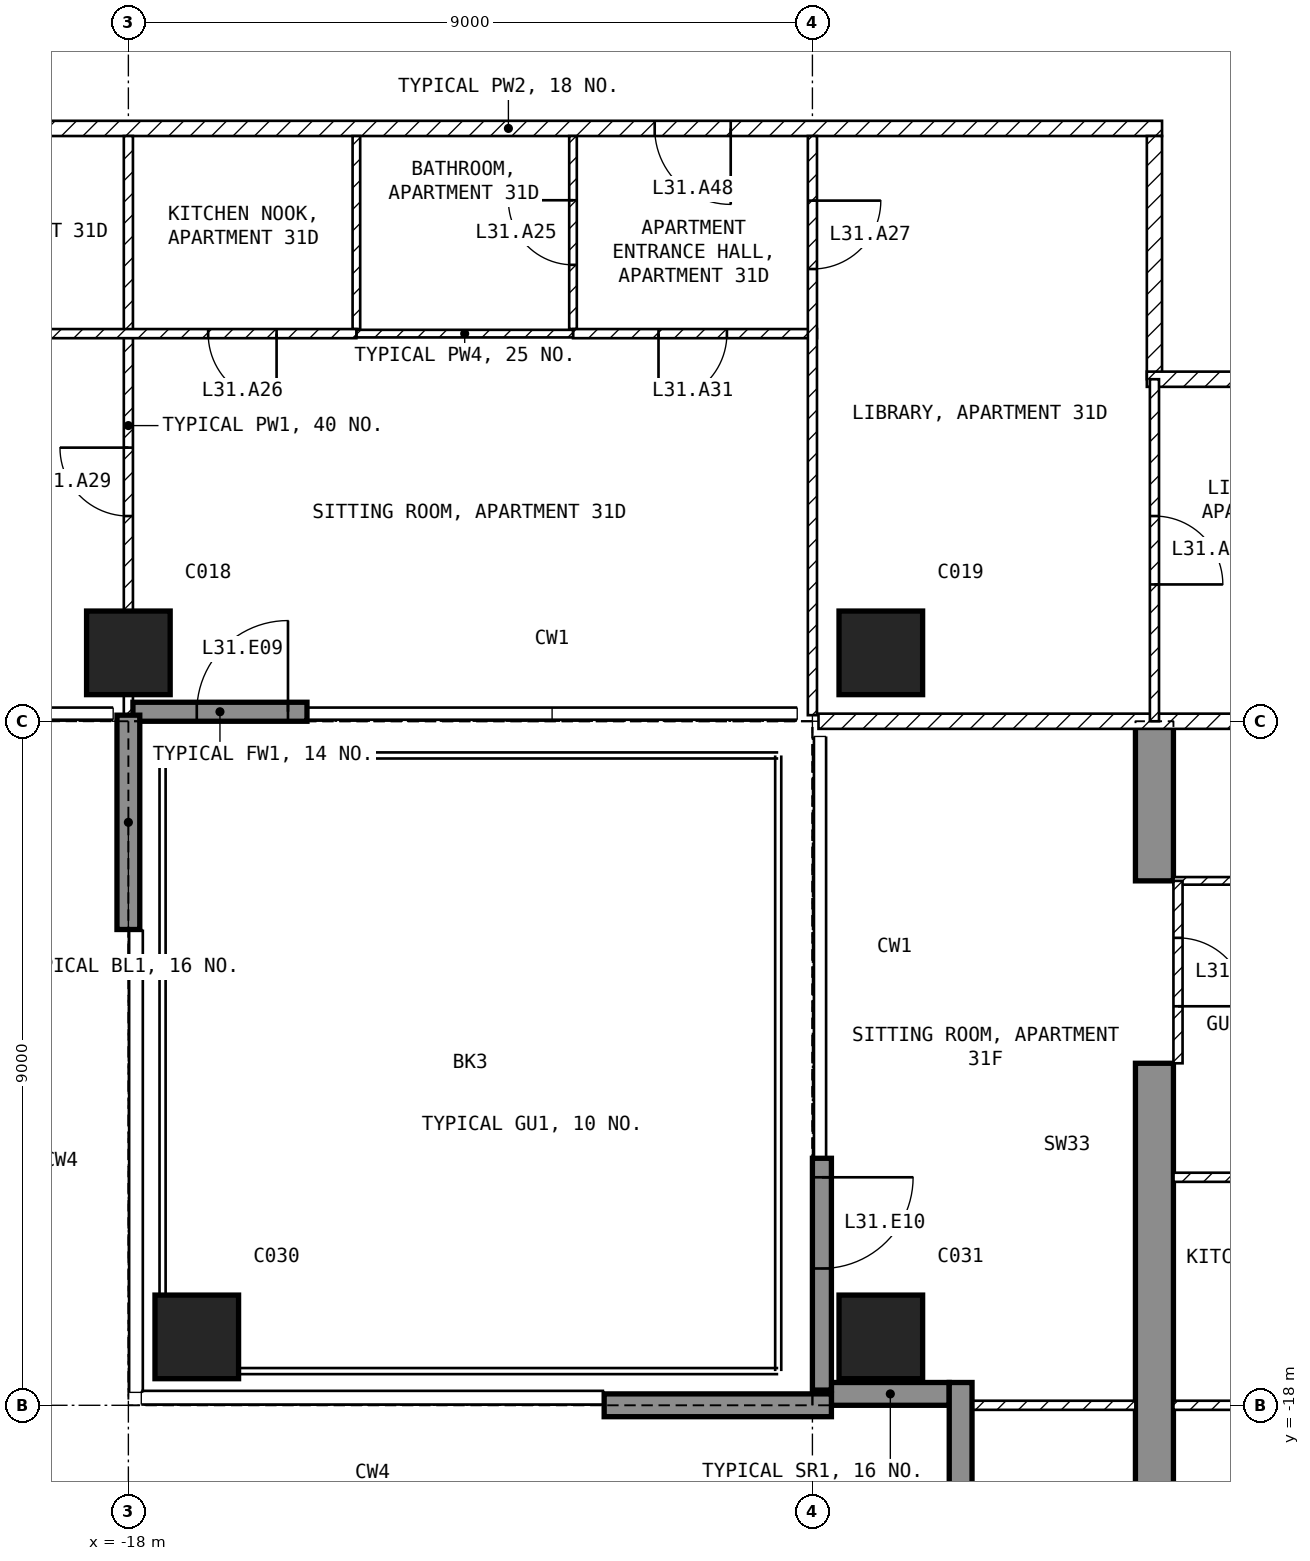
"""IFC4 building model, lengths in metres.
Left out: names, types, materials, properties, quantities, classifications, styles, units other than length and angle.
Written with IfcOpenShell. Run it as: python <this file> out.ifc"""

import sys

from ifc_helpers import new_model, si_unit, direction, frame, frame_2d, origin, origin_2d, place, context, subcontext, project, spatial, polyline, rectangle, outline, extrude, element, fill, save


model = new_model("IFC4")
c1 = context("Model", 3, precision=1e-05, world=origin(), true_north=direction((0.0, 1.0)))
c2 = subcontext(c1, "Body", "Model", "MODEL_VIEW")
j1 = project(units=[si_unit("LENGTHUNIT", "METRE"), si_unit("PLANEANGLEUNIT", "RADIAN")], contexts=[c1])
p1 = place(None, origin())
s1 = spatial("IfcSite", under=j1, at=p1, CompositionType="ELEMENT")
p2 = place(p1, origin())
s2 = spatial("IfcBuilding", under=s1, at=p2, CompositionType="ELEMENT")
p3 = place(p2, frame((0.0, 0.0, 130.4)))
s3 = spatial("IfcBuildingStorey", under=s2, at=p3, CompositionType="ELEMENT", Elevation=130.4)
for number, where, z_axis, x_axis in (
    (1, (-18.0, -8.1, -0.25), (0.0, 0.0, 1.0), (1.0, 0.0, 0.0)),
    (2, (-8.1, -17.1, -0.25), (0.0, 0.0, 1.0), (1.0, 0.0, 0.0)),
    (3, (-8.1, -8.1, -0.25), (0.0, 0.0, 1.0), (1.0, 0.0, 0.0)),
    (4, (-17.1, -17.1, -0.25), (0.0, 0.0, 1.0), (1.0, 0.0, 0.0)),
):
    element("IfcColumn", number, at=place(p3, frame(where, z_axis=z_axis, x_axis=x_axis)), inside=s3, PredefinedType="COLUMN", context=c2, shape_type="SweptSolid", body=[
        extrude(rectangle(XDim=1.1, YDim=1.1, at=origin_2d()), origin(), (0.0, 0.0, 1.0), 3.5),
    ])
p4 = place(p3, frame((-4.75, -20.15, -0.25), z_axis=(1.0, 0.0, 0.0), x_axis=(0.0, 1.0, 0.0)))
e5 = element("IfcWall", 5, at=p4, inside=s3, PredefinedType="SHEAR", context=c2, shape_type="SweptSolid", body=[
    extrude(outline(polyline([(0.0, 0.0), (6.65, 0.0), (6.65, 2.65), (9.05, 2.65), (9.05, 0.0), (11.15, 0.0), (11.15, 3.5), (0.0, 3.5), (0.0, 0.0)])), origin(), (0.0, 0.0, 1.0), 0.5),
])
p5 = place(p3, frame((-17.94, -8.875, 0.0), z_axis=(0.0, 0.0, 1.0), x_axis=(1.0, 0.0, 0.0)))
e6 = element("IfcWall", 6, at=p5, inside=s3, PredefinedType="SOLIDWALL", context=c2, shape_type="SweptSolid", body=[
    extrude(rectangle(XDim=2.29, YDim=0.25, at=frame_2d((1.145, 0.0))), origin(), (0.0, 0.0, 1.0), 3.25),
])
p6 = place(p5, frame((0.84, 0.0, 0.0)))
e7 = element("IfcOpeningElement", 7, at=p6, cuts=e6, PredefinedType="OPENING", context=c2, shape_type="SweptSolid", body=[
    extrude(rectangle(XDim=1.2, YDim=2.4, at=frame_2d((0.6, 1.2))), frame((0.0, 0.135, 0.0), z_axis=(0.0, -1.0, 0.0), x_axis=(1.0, 0.0, 0.0)), (0.0, 0.0, 1.0), 0.27),
])
p7 = place(p3, frame((-8.875, -14.75, 0.0), z_axis=(0.0, 0.0, 1.0), x_axis=(0.0, -1.0, 0.0)))
e8 = element("IfcWall", 8, at=p7, inside=s3, PredefinedType="SOLIDWALL", context=c2, shape_type="SweptSolid", body=[
    extrude(rectangle(XDim=3.05, YDim=0.25, at=frame_2d((1.525, 0.0))), origin(), (0.0, 0.0, 1.0), 3.25),
])
p8 = place(p7, frame((0.25, 0.0, 0.0)))
e9 = element("IfcOpeningElement", 9, at=p8, cuts=e8, PredefinedType="OPENING", context=c2, shape_type="SweptSolid", body=[
    extrude(rectangle(XDim=1.2, YDim=2.4, at=frame_2d((0.6, 1.2))), frame((0.0, 0.135, 0.0), z_axis=(0.0, -1.0, 0.0), x_axis=(1.0, 0.0, 0.0)), (0.0, 0.0, 1.0), 0.27),
])
p9 = place(p3, frame((-8.75, -17.85, 0.0), z_axis=(0.0, 0.0, 1.0), x_axis=(1.0, 0.0, 0.0)))
e10 = element("IfcWall", 10, at=p9, inside=s3, PredefinedType="SOLIDWALL", context=c2, shape_type="SweptSolid", body=[
    extrude(rectangle(XDim=1.55, YDim=0.3, at=frame_2d((0.775, 0.0))), origin(), (0.0, 0.0, 1.0), 3.25),
])
p10 = place(p3, frame((-7.05, -17.7, 0.0), z_axis=(0.0, 0.0, 1.0), x_axis=(0.0, -1.0, 0.0)))
e11 = element("IfcWall", 11, at=p10, inside=s3, PredefinedType="SOLIDWALL", context=c2, shape_type="SweptSolid", body=[
    extrude(rectangle(XDim=1.8, YDim=0.3, at=frame_2d((0.9, 0.0))), origin(), (0.0, 0.0, 1.0), 3.25),
])
p11 = place(p3, frame((-18.0, -8.92, 0.0), z_axis=(0.0, 0.0, 1.0), x_axis=(0.0, -1.0, 0.0)))
e12 = element("IfcWall", 12, at=p11, inside=s3, PredefinedType="SOLIDWALL", context=c2, shape_type="SweptSolid", body=[
    extrude(rectangle(XDim=2.82, YDim=0.3, at=frame_2d((1.41, 0.0))), origin(), (0.0, 0.0, 1.0), 3.25),
])
p12 = place(p3, frame((-8.75, -18.0, 0.0), z_axis=(0.0, 0.0, 1.0), x_axis=(-1.0, 0.0, 0.0)))
e13 = element("IfcWall", 13, at=p12, inside=s3, PredefinedType="SOLIDWALL", context=c2, shape_type="SweptSolid", body=[
    extrude(rectangle(XDim=2.99, YDim=0.3, at=frame_2d((1.495, 0.0))), origin(), (0.0, 0.0, 1.0), 3.25),
])
p13 = place(p3, frame((-4.4, -1.2, 0.0), z_axis=(0.0, 0.0, 1.0), x_axis=(-1.0, 0.0, 0.0)))
e14 = element("IfcWall", 14, at=p13, inside=s3, PredefinedType="PARTITIONING", context=c2, shape_type="SweptSolid", body=[
    extrude(rectangle(XDim=17.2, YDim=0.2, at=frame_2d((8.6, 0.0))), origin(), (0.0, 0.0, 1.0), 3.25),
])
p14 = place(p13, frame((5.675, 0.0, 0.0)))
e15 = element("IfcOpeningElement", 15, at=p14, cuts=e14, PredefinedType="OPENING", context=c2, shape_type="SweptSolid", body=[
    extrude(rectangle(XDim=1.0, YDim=2.1, at=frame_2d((0.5, 1.05))), frame((0.0, 0.11, 0.0), z_axis=(0.0, -1.0, 0.0), x_axis=(1.0, 0.0, 0.0)), (0.0, 0.0, 1.0), 0.22),
])
p15 = place(p3, frame((-4.5, -4.5, 0.0), z_axis=(0.0, 0.0, 1.0), x_axis=(0.0, 1.0, 0.0)))
e16 = element("IfcWall", 16, at=p15, inside=s3, PredefinedType="PARTITIONING", context=c2, shape_type="SweptSolid", body=[
    extrude(rectangle(XDim=3.2, YDim=0.2, at=frame_2d((1.6, 0.0))), origin(), (0.0, 0.0, 1.0), 3.25),
])
p16 = place(p3, frame((-1.1, -4.5, 0.0), z_axis=(0.0, 0.0, 1.0), x_axis=(-1.0, 0.0, 0.0)))
e17 = element("IfcWall", 17, at=p16, inside=s3, PredefinedType="PARTITIONING", context=c2, shape_type="SweptSolid", body=[
    extrude(rectangle(XDim=3.5, YDim=0.2, at=frame_2d((1.75, 0.0))), origin(), (0.0, 0.0, 1.0), 3.25),
])
p17 = place(p3, frame((8.92, -9.0, 0.0), z_axis=(0.0, 0.0, 1.0), x_axis=(-1.0, 0.0, 0.0)))
e18 = element("IfcWall", 18, at=p17, inside=s3, PredefinedType="PARTITIONING", context=c2, shape_type="SweptSolid", body=[
    extrude(rectangle(XDim=17.84, YDim=0.2, at=frame_2d((8.92, 0.0))), origin(), (0.0, 0.0, 1.0), 3.25),
])
p18 = place(p17, frame((8.42, 0.0, 0.0)))
e19 = element("IfcOpeningElement", 19, at=p18, cuts=e18, PredefinedType="OPENING", context=c2, shape_type="SweptSolid", body=[
    extrude(rectangle(XDim=1.0, YDim=2.1, at=frame_2d((0.5, 1.05))), frame((0.0, 0.11, 0.0), z_axis=(0.0, -1.0, 0.0), x_axis=(1.0, 0.0, 0.0)), (0.0, 0.0, 1.0), 0.22),
])
p19 = place(p3, frame((-12.15, -3.84, 0.0), z_axis=(0.0, 0.0, 1.0), x_axis=(0.0, 1.0, 0.0)))
e20 = element("IfcWall", 20, at=p19, inside=s3, PredefinedType="PARTITIONING", context=c2, shape_type="SweptSolid", body=[
    extrude(rectangle(XDim=2.54, YDim=0.1, at=frame_2d((1.27, 0.0))), origin(), (0.0, 0.0, 1.0), 3.25),
])
p20 = place(p19, frame((0.845, 0.0, 0.0)))
e21 = element("IfcOpeningElement", 21, at=p20, cuts=e20, PredefinedType="OPENING", context=c2, shape_type="SweptSolid", body=[
    extrude(rectangle(XDim=0.85, YDim=2.1, at=frame_2d((0.425, 1.05))), frame((0.0, 0.06, 0.0), z_axis=(0.0, -1.0, 0.0), x_axis=(1.0, 0.0, 0.0)), (0.0, 0.0, 1.0), 0.12),
])
p21 = place(p3, frame((-8.94, -3.9, 0.0), z_axis=(0.0, 0.0, 1.0), x_axis=(-1.0, 0.0, 0.0)))
e22 = element("IfcWall", 22, at=p21, inside=s3, PredefinedType="PARTITIONING", context=c2, shape_type="SweptSolid", body=[
    extrude(rectangle(XDim=3.21, YDim=0.12, at=frame_2d((1.605, 0.0))), origin(), (0.0, 0.0, 1.0), 3.25),
])
p22 = place(p21, frame((1.185, 0.0, 0.0)))
e23 = element("IfcOpeningElement", 23, at=p22, cuts=e22, PredefinedType="OPENING", context=c2, shape_type="SweptSolid", body=[
    extrude(rectangle(XDim=0.9, YDim=2.1, at=frame_2d((0.45, 1.05))), frame((0.0, 0.07, 0.0), z_axis=(0.0, -1.0, 0.0), x_axis=(1.0, 0.0, 0.0)), (0.0, 0.0, 1.0), 0.14),
])
p23 = place(p3, frame((-9.0, -1.3, 0.0), z_axis=(0.0, 0.0, 1.0), x_axis=(0.0, -1.0, 0.0)))
e24 = element("IfcWall", 24, at=p23, inside=s3, PredefinedType="PARTITIONING", context=c2, shape_type="SweptSolid", body=[
    extrude(rectangle(XDim=7.62, YDim=0.12, at=frame_2d((3.81, 0.0))), origin(), (0.0, 0.0, 1.0), 3.25),
])
p24 = place(p23, frame((0.85, 0.0, 0.0)))
e25 = element("IfcOpeningElement", 25, at=p24, cuts=e24, PredefinedType="OPENING", context=c2, shape_type="SweptSolid", body=[
    extrude(rectangle(XDim=0.9, YDim=2.1, at=frame_2d((0.45, 1.05))), frame((0.0, 0.07, 0.0), z_axis=(0.0, -1.0, 0.0), x_axis=(1.0, 0.0, 0.0)), (0.0, 0.0, 1.0), 0.14),
])
p25 = place(p3, frame((-15.0, -3.84, 0.0), z_axis=(0.0, 0.0, 1.0), x_axis=(0.0, 1.0, 0.0)))
e26 = element("IfcWall", 26, at=p25, inside=s3, PredefinedType="PARTITIONING", context=c2, shape_type="SweptSolid", body=[
    extrude(rectangle(XDim=2.54, YDim=0.1, at=frame_2d((1.27, 0.0))), origin(), (0.0, 0.0, 1.0), 3.25),
])
p26 = place(p3, frame((-12.15, -3.9, 0.0), z_axis=(0.0, 0.0, 1.0), x_axis=(-1.0, 0.0, 0.0)))
e27 = element("IfcWall", 27, at=p26, inside=s3, PredefinedType="PARTITIONING", context=c2, shape_type="SweptSolid", body=[
    extrude(rectangle(XDim=2.85, YDim=0.1, at=frame_2d((1.425, 0.0))), origin(), (0.0, 0.0, 1.0), 3.25),
])
p27 = place(p3, frame((-18.0, -8.92, 0.0), z_axis=(0.0, 0.0, 1.0), x_axis=(0.0, 1.0, 0.0)))
e28 = element("IfcWall", 28, at=p27, inside=s3, PredefinedType="PARTITIONING", context=c2, shape_type="SweptSolid", body=[
    extrude(rectangle(XDim=7.62, YDim=0.12, at=frame_2d((3.81, 0.0))), origin(), (0.0, 0.0, 1.0), 2.414),
])
p28 = place(p27, frame((2.62, 0.0, 0.0)))
e29 = element("IfcOpeningElement", 29, at=p28, cuts=e28, PredefinedType="OPENING", context=c2, shape_type="SweptSolid", body=[
    extrude(rectangle(XDim=0.9, YDim=2.1, at=frame_2d((0.45, 1.05))), frame((0.0, 0.07, 0.0), z_axis=(0.0, -1.0, 0.0), x_axis=(1.0, 0.0, 0.0)), (0.0, 0.0, 1.0), 0.14),
])
p29 = place(p3, frame((-15.0, -3.9, 0.0), z_axis=(0.0, 0.0, 1.0), x_axis=(-1.0, 0.0, 0.0)))
e30 = element("IfcWall", 30, at=p29, inside=s3, PredefinedType="PARTITIONING", context=c2, shape_type="SweptSolid", body=[
    extrude(rectangle(XDim=6.6, YDim=0.12, at=frame_2d((3.3, 0.0))), origin(), (0.0, 0.0, 1.0), 3.25),
])
p30 = place(p29, frame((1.05, 0.0, 0.0)))
e31 = element("IfcOpeningElement", 31, at=p30, cuts=e30, PredefinedType="OPENING", context=c2, shape_type="SweptSolid", body=[
    extrude(rectangle(XDim=0.9, YDim=2.1, at=frame_2d((0.45, 1.05))), frame((0.0, 0.07, 0.0), z_axis=(0.0, -1.0, 0.0), x_axis=(1.0, 0.0, 0.0)), (0.0, 0.0, 1.0), 0.14),
])
p31 = place(p29, frame((4.35, 0.0, 0.0)))
e32 = element("IfcOpeningElement", 32, at=p31, cuts=e30, PredefinedType="OPENING", context=c2, shape_type="SweptSolid", body=[
    extrude(rectangle(XDim=0.9, YDim=2.1, at=frame_2d((0.45, 1.05))), frame((0.0, 0.07, 0.0), z_axis=(0.0, -1.0, 0.0), x_axis=(1.0, 0.0, 0.0)), (0.0, 0.0, 1.0), 0.14),
])
p32 = place(p3, frame((-4.5, -4.5, 0.0), z_axis=(0.0, 0.0, 1.0), x_axis=(0.0, -1.0, 0.0)))
e33 = element("IfcWall", 33, at=p32, inside=s3, PredefinedType="PARTITIONING", context=c2, shape_type="SweptSolid", body=[
    extrude(rectangle(XDim=4.5, YDim=0.12, at=frame_2d((2.25, 0.0))), origin(), (0.0, 0.0, 1.0), 3.25),
])
p33 = place(p32, frame((1.8, 0.0, 0.0)))
e34 = element("IfcOpeningElement", 34, at=p33, cuts=e33, PredefinedType="OPENING", context=c2, shape_type="SweptSolid", body=[
    extrude(rectangle(XDim=0.9, YDim=2.1, at=frame_2d((0.45, 1.05))), frame((0.0, 0.07, 0.0), z_axis=(0.0, -1.0, 0.0), x_axis=(1.0, 0.0, 0.0)), (0.0, 0.0, 1.0), 0.14),
])
p34 = place(p3, frame((-2.1, -11.1, 0.0), z_axis=(0.0, 0.0, 1.0), x_axis=(-1.0, 0.0, 0.0)))
e35 = element("IfcWall", 35, at=p34, inside=s3, PredefinedType="PARTITIONING", context=c2, shape_type="SweptSolid", body=[
    extrude(rectangle(XDim=2.15, YDim=0.1, at=frame_2d((1.075, 0.0))), origin(), (0.0, 0.0, 1.0), 3.25),
])
p35 = place(p3, frame((-0.44, -15.0, 0.0), z_axis=(0.0, 0.0, 1.0), x_axis=(-1.0, 0.0, 0.0)))
e36 = element("IfcWall", 36, at=p35, inside=s3, PredefinedType="PARTITIONING", context=c2, shape_type="SweptSolid", body=[
    extrude(rectangle(XDim=3.81, YDim=0.12, at=frame_2d((1.905, 0.0))), origin(), (0.0, 0.0, 1.0), 3.25),
])
p36 = place(p3, frame((4.25, -18.0, 0.0), z_axis=(0.0, 0.0, 1.0), x_axis=(-1.0, 0.0, 0.0)))
e37 = element("IfcWall", 37, at=p36, inside=s3, PredefinedType="PARTITIONING", context=c2, shape_type="SweptSolid", body=[
    extrude(rectangle(XDim=8.5, YDim=0.12, at=frame_2d((4.25, 0.0))), origin(), (0.0, 0.0, 1.0), 3.25),
])
p37 = place(p36, frame((1.925, 0.0, 0.0)))
e38 = element("IfcOpeningElement", 38, at=p37, cuts=e37, PredefinedType="OPENING", context=c2, shape_type="SweptSolid", body=[
    extrude(rectangle(XDim=0.9, YDim=2.1, at=frame_2d((0.45, 1.05))), frame((0.0, 0.07, 0.0), z_axis=(0.0, -1.0, 0.0), x_axis=(1.0, 0.0, 0.0)), (0.0, 0.0, 1.0), 0.14),
])
p38 = place(p3, frame((-4.75, -18.0, 0.0), z_axis=(0.0, 0.0, 1.0), x_axis=(-1.0, 0.0, 0.0)))
e39 = element("IfcWall", 39, at=p38, inside=s3, PredefinedType="PARTITIONING", context=c2, shape_type="SweptSolid", body=[
    extrude(rectangle(XDim=2.37, YDim=0.12, at=frame_2d((1.185, 0.0))), origin(), (0.0, 0.0, 1.0), 3.25),
])
p39 = place(p3, frame((-4.19, -11.1, 0.0), z_axis=(0.0, 0.0, 1.0), x_axis=(0.0, -1.0, 0.0)))
e40 = element("IfcWall", 40, at=p39, inside=s3, PredefinedType="PARTITIONING", context=c2, shape_type="SweptSolid", body=[
    extrude(rectangle(XDim=2.4, YDim=0.12, at=frame_2d((1.2, 0.0))), origin(), (0.0, 0.0, 1.0), 2.4),
])
p40 = place(p39, frame((0.75, 0.0, 0.0)))
e41 = element("IfcOpeningElement", 41, at=p40, cuts=e40, PredefinedType="OPENING", context=c2, shape_type="SweptSolid", body=[
    extrude(rectangle(XDim=0.9, YDim=2.1, at=frame_2d((0.45, 1.05))), frame((0.0, 0.07, 0.0), z_axis=(0.0, -1.0, 0.0), x_axis=(1.0, 0.0, 0.0)), (0.0, 0.0, 1.0), 0.14),
])
p41 = place(p6, origin())
e42 = element("IfcDoor", 42, at=p41, inside=s3, OperationType="SINGLE_SWING_RIGHT", PredefinedType="DOOR", context=c2, shape_type="SweptSolid", body=[
    extrude(rectangle(XDim=1.2, YDim=2.4, at=frame_2d((0.6, 1.2))), frame((0.0, 0.025, 0.0), z_axis=(0.0, -1.0, 0.0), x_axis=(1.0, 0.0, 0.0)), (0.0, 0.0, 1.0), 0.05),
])
fill(e7, e42)
p42 = place(p8, origin())
e43 = element("IfcDoor", 43, at=p42, inside=s3, OperationType="SINGLE_SWING_LEFT", PredefinedType="DOOR", context=c2, shape_type="SweptSolid", body=[
    extrude(rectangle(XDim=1.2, YDim=2.4, at=frame_2d((0.6, 1.2))), frame((0.0, 0.025, 0.0), z_axis=(0.0, -1.0, 0.0), x_axis=(1.0, 0.0, 0.0)), (0.0, 0.0, 1.0), 0.05),
])
fill(e9, e43)
p43 = place(p20, origin())
e44 = element("IfcDoor", 44, at=p43, inside=s3, OperationType="SINGLE_SWING_RIGHT", PredefinedType="DOOR", context=c2, shape_type="SweptSolid", body=[
    extrude(rectangle(XDim=0.85, YDim=2.1, at=frame_2d((0.425, 1.05))), frame((0.0, 0.025, 0.0), z_axis=(0.0, -1.0, 0.0), x_axis=(1.0, 0.0, 0.0)), (0.0, 0.0, 1.0), 0.05),
])
fill(e21, e44)
p44 = place(p30, origin())
e45 = element("IfcDoor", 45, at=p44, inside=s3, OperationType="SINGLE_SWING_LEFT", PredefinedType="DOOR", context=c2, shape_type="SweptSolid", body=[
    extrude(rectangle(XDim=0.9, YDim=2.1, at=frame_2d((0.45, 1.05))), frame((0.0, 0.025, 0.0), z_axis=(0.0, -1.0, 0.0), x_axis=(1.0, 0.0, 0.0)), (0.0, 0.0, 1.0), 0.05),
])
fill(e31, e45)
p45 = place(p24, origin())
e46 = element("IfcDoor", 46, at=p45, inside=s3, OperationType="SINGLE_SWING_LEFT", PredefinedType="DOOR", context=c2, shape_type="SweptSolid", body=[
    extrude(rectangle(XDim=0.9, YDim=2.1, at=frame_2d((0.45, 1.05))), frame((0.0, 0.025, 0.0), z_axis=(0.0, -1.0, 0.0), x_axis=(1.0, 0.0, 0.0)), (0.0, 0.0, 1.0), 0.05),
])
fill(e25, e46)
p46 = place(p33, origin())
e47 = element("IfcDoor", 47, at=p46, inside=s3, OperationType="SINGLE_SWING_RIGHT", PredefinedType="DOOR", context=c2, shape_type="SweptSolid", body=[
    extrude(rectangle(XDim=0.9, YDim=2.1, at=frame_2d((0.45, 1.05))), frame((0.0, 0.025, 0.0), z_axis=(0.0, -1.0, 0.0), x_axis=(1.0, 0.0, 0.0)), (0.0, 0.0, 1.0), 0.05),
])
fill(e34, e47)
p47 = place(p28, origin())
e48 = element("IfcDoor", 48, at=p47, inside=s3, OperationType="SINGLE_SWING_RIGHT", PredefinedType="DOOR", context=c2, shape_type="SweptSolid", body=[
    extrude(rectangle(XDim=0.9, YDim=2.1, at=frame_2d((0.45, 1.05))), frame((0.0, 0.025, 0.0), z_axis=(0.0, -1.0, 0.0), x_axis=(1.0, 0.0, 0.0)), (0.0, 0.0, 1.0), 0.05),
])
fill(e29, e48)
p48 = place(p22, origin())
e49 = element("IfcDoor", 49, at=p48, inside=s3, OperationType="SINGLE_SWING_RIGHT", PredefinedType="DOOR", context=c2, shape_type="SweptSolid", body=[
    extrude(rectangle(XDim=0.9, YDim=2.1, at=frame_2d((0.45, 1.05))), frame((0.0, 0.025, 0.0), z_axis=(0.0, -1.0, 0.0), x_axis=(1.0, 0.0, 0.0)), (0.0, 0.0, 1.0), 0.05),
])
fill(e23, e49)
p49 = place(p14, origin())
e50 = element("IfcDoor", 50, at=p49, inside=s3, OperationType="SINGLE_SWING_LEFT", PredefinedType="DOOR", context=c2, shape_type="SweptSolid", body=[
    extrude(rectangle(XDim=1.0, YDim=2.1, at=frame_2d((0.5, 1.05))), frame((0.0, 0.025, 0.0), z_axis=(0.0, -1.0, 0.0), x_axis=(1.0, 0.0, 0.0)), (0.0, 0.0, 1.0), 0.05),
])
fill(e15, e50)
p50 = place(p40, origin())
e51 = element("IfcDoor", 51, at=p50, inside=s3, OperationType="SINGLE_SWING_RIGHT", PredefinedType="DOOR", context=c2, shape_type="SweptSolid", body=[
    extrude(rectangle(XDim=0.9, YDim=2.1, at=frame_2d((0.45, 1.05))), frame((0.0, 0.025, 0.0), z_axis=(0.0, -1.0, 0.0), x_axis=(1.0, 0.0, 0.0)), (0.0, 0.0, 1.0), 0.05),
])
fill(e41, e51)
save(model, sys.argv[1])
